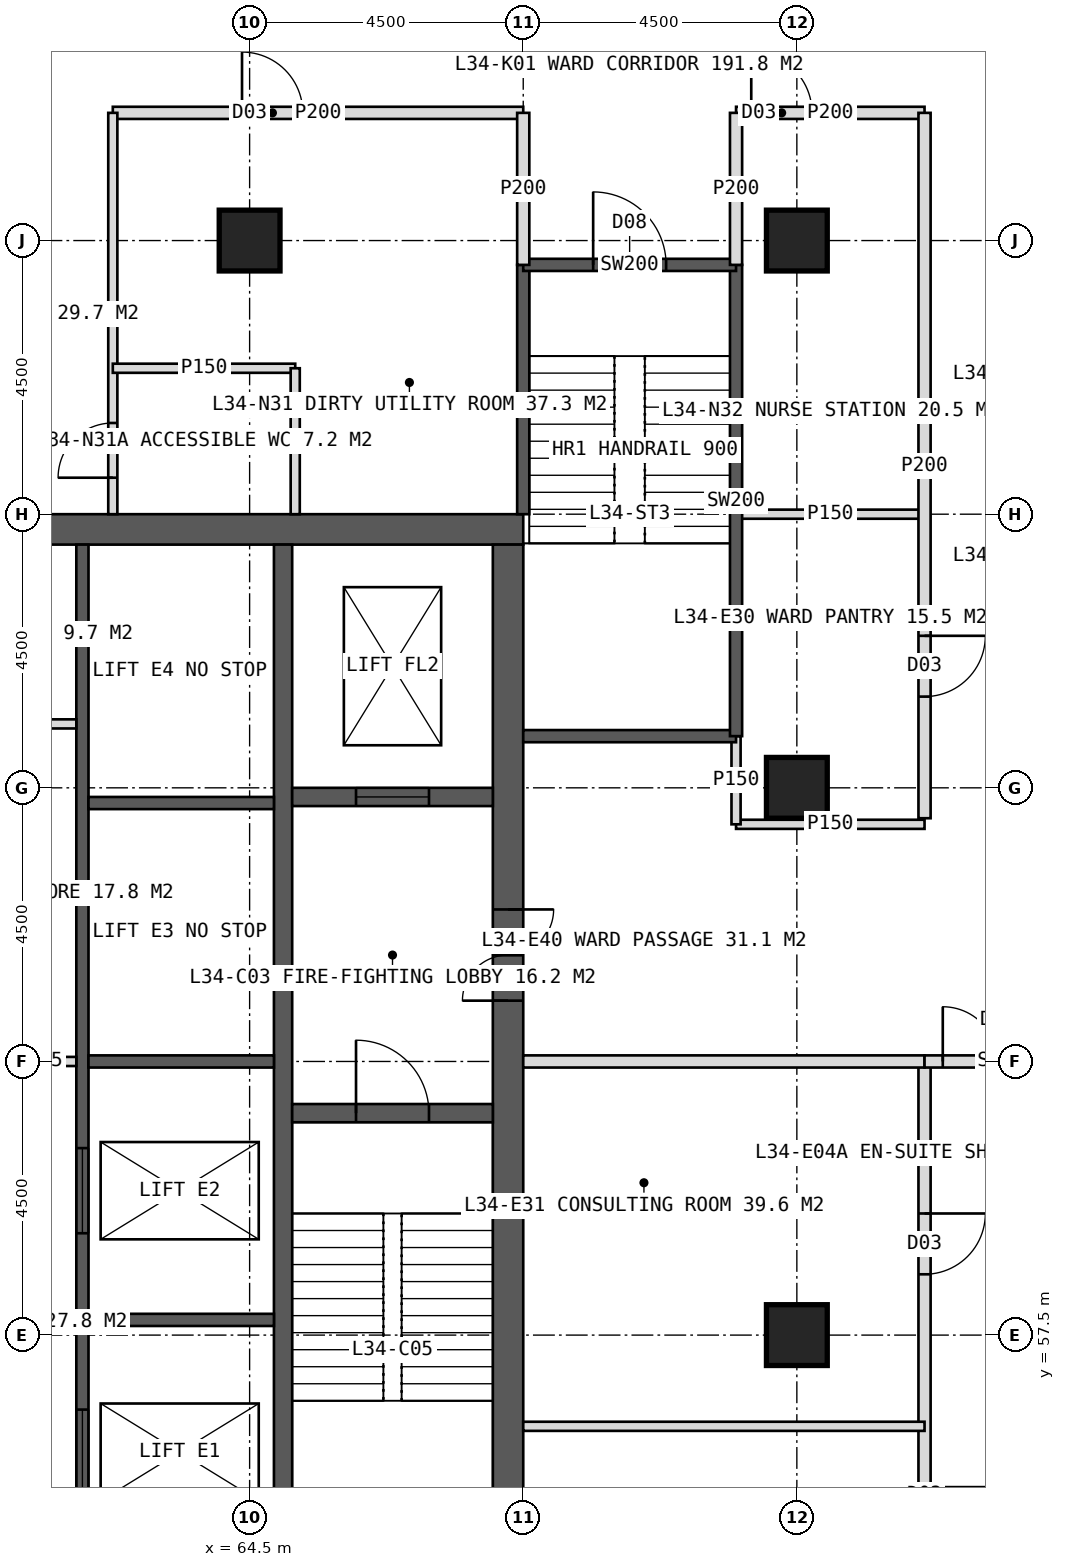
"""IFC4 building model, lengths in metres.
Left out: names, types, materials, properties, quantities, classifications, styles, units other than length and angle.
Written with IfcOpenShell. Run it as: python <this file> out.ifc"""

import sys

from ifc_helpers import new_model, si_unit, direction, frame, frame_2d, origin, origin_2d, place, context, subcontext, project, spatial, rectangle, hollow_rectangle, extrude, element, fill, save


model = new_model("IFC4")
c1 = context("Model", 3, precision=1e-05, world=origin(), true_north=direction((0.0, 1.0)))
c2 = subcontext(c1, "Body", "Model", "MODEL_VIEW")
j1 = project(units=[si_unit("LENGTHUNIT", "METRE"), si_unit("PLANEANGLEUNIT", "RADIAN")], contexts=[c1])
p1 = place(None, origin())
s1 = spatial("IfcSite", under=j1, at=p1, CompositionType="ELEMENT")
p2 = place(p1, origin())
s2 = spatial("IfcBuilding", under=s1, at=p2, CompositionType="ELEMENT")
p3 = place(p2, frame((0.0, 0.0, 144.0)))
s3 = spatial("IfcBuildingStorey", under=s2, at=p3, CompositionType="ELEMENT", Elevation=144.0)
p4 = place(p3, frame((51.0, 70.75, 0.0), z_axis=(0.0, 0.0, 1.0), x_axis=(1.0, 0.0, 0.0)))
e1 = element("IfcWall", 1, at=p4, inside=s3, PredefinedType="SHEAR", context=c2, shape_type="SweptSolid", body=[
    extrude(rectangle(XDim=18.0, YDim=0.5, at=frame_2d((9.0, 0.0))), origin(), (0.0, 0.0, 1.0), 4.0),
])
p5 = place(p4, frame((8.1, 0.0, 0.0)))
e2 = element("IfcOpeningElement", 2, at=p5, cuts=e1, PredefinedType="OPENING", context=c2, shape_type="SweptSolid", body=[
    extrude(rectangle(XDim=1.8, YDim=2.2, at=frame_2d((0.9, 1.1))), frame((0.0, 0.26, 0.0), z_axis=(0.0, -1.0, 0.0), x_axis=(1.0, 0.0, 0.0)), (0.0, 0.0, 1.0), 0.52),
])
p6 = place(p3, frame((68.75, 53.5, 0.0), z_axis=(0.0, 0.0, 1.0), x_axis=(0.0, 1.0, 0.0)))
e3 = element("IfcWall", 3, at=p6, inside=s3, PredefinedType="SHEAR", context=c2, shape_type="SweptSolid", body=[
    extrude(rectangle(XDim=17.0, YDim=0.5, at=frame_2d((8.5, 0.0))), origin(), (0.0, 0.0, 1.0), 4.0),
])
p7 = place(p6, frame((9.5, 0.0, 0.0)))
e4 = element("IfcOpeningElement", 4, at=p7, cuts=e3, PredefinedType="OPENING", context=c2, shape_type="SweptSolid", body=[
    extrude(rectangle(XDim=1.5, YDim=2.2, at=frame_2d((0.75, 1.1))), frame((0.0, 0.26, 0.0), z_axis=(0.0, -1.0, 0.0), x_axis=(1.0, 0.0, 0.0)), (0.0, 0.0, 1.0), 0.52),
])
p8 = place(p3, frame((65.05, 53.5, 0.0), z_axis=(0.0, 0.0, 1.0), x_axis=(0.0, 1.0, 0.0)))
e5 = element("IfcWall", 5, at=p8, inside=s3, PredefinedType="SHEAR", context=c2, shape_type="SweptSolid", body=[
    extrude(rectangle(XDim=17.0, YDim=0.3, at=frame_2d((8.5, 0.0))), origin(), (0.0, 0.0, 1.0), 4.0),
])
p9 = place(p3, frame((61.75, 53.5, 0.0), z_axis=(0.0, 0.0, 1.0), x_axis=(0.0, 1.0, 0.0)))
e6 = element("IfcWall", 6, at=p9, inside=s3, PredefinedType="SHEAR", context=c2, shape_type="SweptSolid", body=[
    extrude(rectangle(XDim=17.0, YDim=0.2, at=frame_2d((8.5, 0.0))), origin(), (0.0, 0.0, 1.0), 4.0),
])
p10 = place(p9, frame((1.375, 0.0, 0.0)))
e7 = element("IfcOpeningElement", 7, at=p10, cuts=e6, PredefinedType="OPENING", context=c2, shape_type="SweptSolid", body=[
    extrude(rectangle(XDim=1.4, YDim=2.2, at=frame_2d((0.7, 1.1))), frame((0.0, 0.11, 0.0), z_axis=(0.0, -1.0, 0.0), x_axis=(1.0, 0.0, 0.0)), (0.0, 0.0, 1.0), 0.22),
])
p11 = place(p9, frame((5.675, 0.0, 0.0)))
e8 = element("IfcOpeningElement", 8, at=p11, cuts=e6, PredefinedType="OPENING", context=c2, shape_type="SweptSolid", body=[
    extrude(rectangle(XDim=1.4, YDim=2.2, at=frame_2d((0.7, 1.1))), frame((0.0, 0.11, 0.0), z_axis=(0.0, -1.0, 0.0), x_axis=(1.0, 0.0, 0.0)), (0.0, 0.0, 1.0), 0.22),
])
for number, where, z_axis, x_axis in (
    (9, (61.85, 57.75, 0.0), (0.0, 0.0, 1.0), (1.0, 0.0, 0.0)),
    (10, (61.85, 62.0, 0.0), (0.0, 0.0, 1.0), (1.0, 0.0, 0.0)),
    (11, (61.85, 66.25, 0.0), (0.0, 0.0, 1.0), (1.0, 0.0, 0.0)),
):
    element("IfcWall", number, at=place(p3, frame(where, z_axis=z_axis, x_axis=x_axis)), inside=s3, PredefinedType="SHEAR", context=c2, shape_type="SweptSolid", body=[
        extrude(rectangle(XDim=3.05, YDim=0.2, at=frame_2d((1.525, 0.0))), origin(), (0.0, 0.0, 1.0), 4.0),
    ])
p12 = place(p3, frame((65.2, 61.15, 0.0), z_axis=(0.0, 0.0, 1.0), x_axis=(1.0, 0.0, 0.0)))
e12 = element("IfcWall", 12, at=p12, inside=s3, PredefinedType="SHEAR", context=c2, shape_type="SweptSolid", body=[
    extrude(rectangle(XDim=3.3, YDim=0.3, at=frame_2d((1.65, 0.0))), origin(), (0.0, 0.0, 1.0), 4.0),
])
p13 = place(p12, frame((1.05, 0.0, 0.0)))
e13 = element("IfcOpeningElement", 13, at=p13, cuts=e12, PredefinedType="OPENING", context=c2, shape_type="SweptSolid", body=[
    extrude(rectangle(XDim=1.2, YDim=2.1, at=frame_2d((0.6, 1.05))), frame((0.0, 0.16, 0.0), z_axis=(0.0, -1.0, 0.0), x_axis=(1.0, 0.0, 0.0)), (0.0, 0.0, 1.0), 0.32),
])
p14 = place(p3, frame((65.2, 66.35, 0.0), z_axis=(0.0, 0.0, 1.0), x_axis=(1.0, 0.0, 0.0)))
e14 = element("IfcWall", 14, at=p14, inside=s3, PredefinedType="SHEAR", context=c2, shape_type="SweptSolid", body=[
    extrude(rectangle(XDim=3.3, YDim=0.3, at=frame_2d((1.65, 0.0))), origin(), (0.0, 0.0, 1.0), 4.0),
])
p15 = place(p14, frame((1.05, 0.0, 0.0)))
e15 = element("IfcOpeningElement", 15, at=p15, cuts=e14, PredefinedType="OPENING", context=c2, shape_type="SweptSolid", body=[
    extrude(rectangle(XDim=1.2, YDim=2.2, at=frame_2d((0.6, 1.1))), frame((0.0, 0.16, 0.0), z_axis=(0.0, -1.0, 0.0), x_axis=(1.0, 0.0, 0.0)), (0.0, 0.0, 1.0), 0.32),
])
for number, where, z_axis, x_axis in (
    (16, (73.5, 75.5, 0.0), (0.0, 0.0, 1.0), (1.0, 0.0, 0.0)),
    (17, (64.5, 75.5, 0.0), (0.0, 0.0, 1.0), (1.0, 0.0, 0.0)),
    (18, (73.5, 57.5, 0.0), (0.0, 0.0, 1.0), (1.0, 0.0, 0.0)),
    (19, (73.5, 66.5, 0.0), (0.0, 0.0, 1.0), (1.0, 0.0, 0.0)),
):
    element("IfcColumn", number, at=place(p3, frame(where, z_axis=z_axis, x_axis=x_axis)), inside=s3, PredefinedType="COLUMN", context=c2, shape_type="SweptSolid", body=[
        extrude(hollow_rectangle(XDim=1.0, YDim=1.0, WallThickness=0.1, at=origin_2d()), origin(), (0.0, 0.0, 1.0), 4.0),
    ])
p16 = place(p3, frame((62.25, 77.6, 0.0), z_axis=(0.0, 0.0, 1.0), x_axis=(1.0, 0.0, 0.0)))
e20 = element("IfcWall", 20, at=p16, inside=s3, PredefinedType="PARTITIONING", context=c2, shape_type="SweptSolid", body=[
    extrude(rectangle(XDim=6.75, YDim=0.2, at=frame_2d((3.375, 0.0))), origin(), (0.0, 0.0, 1.0), 3.75),
])
p17 = place(p16, frame((2.125, 0.0, 0.0)))
e21 = element("IfcOpeningElement", 21, at=p17, cuts=e20, PredefinedType="OPENING", context=c2, shape_type="SweptSolid", body=[
    extrude(rectangle(XDim=1.0, YDim=2.1, at=frame_2d((0.5, 1.05))), frame((0.0, 0.11, 0.0), z_axis=(0.0, -1.0, 0.0), x_axis=(1.0, 0.0, 0.0)), (0.0, 0.0, 1.0), 0.22),
])
p18 = place(p3, frame((72.5, 77.6, 0.0), z_axis=(0.0, 0.0, 1.0), x_axis=(1.0, 0.0, 0.0)))
e22 = element("IfcWall", 22, at=p18, inside=s3, PredefinedType="PARTITIONING", context=c2, shape_type="SweptSolid", body=[
    extrude(rectangle(XDim=3.1, YDim=0.2, at=frame_2d((1.55, 0.0))), origin(), (0.0, 0.0, 1.0), 3.75),
])
p19 = place(p18, frame((0.25, 0.0, 0.0)))
e23 = element("IfcOpeningElement", 23, at=p19, cuts=e22, PredefinedType="OPENING", context=c2, shape_type="SweptSolid", body=[
    extrude(rectangle(XDim=1.0, YDim=2.1, at=frame_2d((0.5, 1.05))), frame((0.0, 0.11, 0.0), z_axis=(0.0, -1.0, 0.0), x_axis=(1.0, 0.0, 0.0)), (0.0, 0.0, 1.0), 0.22),
])
p20 = place(p3, frame((62.25, 71.0, 0.0), z_axis=(0.0, 0.0, 1.0), x_axis=(0.0, 1.0, 0.0)))
e24 = element("IfcWall", 24, at=p20, inside=s3, PredefinedType="PARTITIONING", context=c2, shape_type="SweptSolid", body=[
    extrude(rectangle(XDim=6.6, YDim=0.15, at=frame_2d((3.3, 0.0))), origin(), (0.0, 0.0, 1.0), 3.75),
])
p21 = place(p20, frame((0.6, 0.0, 0.0)))
e25 = element("IfcOpeningElement", 25, at=p21, cuts=e24, PredefinedType="OPENING", context=c2, shape_type="SweptSolid", body=[
    extrude(rectangle(XDim=0.9, YDim=2.1, at=frame_2d((0.45, 1.05))), frame((0.0, 0.085, 0.0), z_axis=(0.0, -1.0, 0.0), x_axis=(1.0, 0.0, 0.0)), (0.0, 0.0, 1.0), 0.17),
])
p22 = place(p3, frame((62.25, 73.4, 0.0), z_axis=(0.0, 0.0, 1.0), x_axis=(1.0, 0.0, 0.0)))
e26 = element("IfcWall", 26, at=p22, inside=s3, PredefinedType="PARTITIONING", context=c2, shape_type="SweptSolid", body=[
    extrude(rectangle(XDim=3.0, YDim=0.15, at=frame_2d((1.5, 0.0))), origin(), (0.0, 0.0, 1.0), 3.75),
])
p23 = place(p3, frame((65.25, 71.0, 0.0), z_axis=(0.0, 0.0, 1.0), x_axis=(0.0, 1.0, 0.0)))
e27 = element("IfcWall", 27, at=p23, inside=s3, PredefinedType="PARTITIONING", context=c2, shape_type="SweptSolid", body=[
    extrude(rectangle(XDim=2.4, YDim=0.15, at=frame_2d((1.2, 0.0))), origin(), (0.0, 0.0, 1.0), 3.75),
])
p24 = place(p3, frame((72.5, 71.0, 0.0), z_axis=(0.0, 0.0, 1.0), x_axis=(1.0, 0.0, 0.0)))
e28 = element("IfcWall", 28, at=p24, inside=s3, PredefinedType="PARTITIONING", context=c2, shape_type="SweptSolid", body=[
    extrude(rectangle(XDim=3.1, YDim=0.15, at=frame_2d((1.55, 0.0))), origin(), (0.0, 0.0, 1.0), 3.75),
])
p25 = place(p3, frame((75.6, 77.6, 0.0), z_axis=(0.0, 0.0, 1.0), x_axis=(0.0, -1.0, 0.0)))
e29 = element("IfcWall", 29, at=p25, inside=s3, PredefinedType="PARTITIONING", context=c2, shape_type="SweptSolid", body=[
    extrude(rectangle(XDim=11.6, YDim=0.2, at=frame_2d((5.8, 0.0))), origin(), (0.0, 0.0, 1.0), 3.75),
])
p26 = place(p25, frame((8.6, 0.0, 0.0)))
e30 = element("IfcOpeningElement", 30, at=p26, cuts=e29, PredefinedType="OPENING", context=c2, shape_type="SweptSolid", body=[
    extrude(rectangle(XDim=1.0, YDim=2.1, at=frame_2d((0.5, 1.05))), frame((0.0, 0.11, 0.0), z_axis=(0.0, -1.0, 0.0), x_axis=(1.0, 0.0, 0.0)), (0.0, 0.0, 1.0), 0.22),
])
p27 = place(p3, frame((75.6, 62.0, 0.0), z_axis=(0.0, 0.0, 1.0), x_axis=(0.0, -1.0, 0.0)))
e31 = element("IfcWall", 31, at=p27, inside=s3, PredefinedType="PARTITIONING", context=c2, shape_type="SweptSolid", body=[
    extrude(rectangle(XDim=15.6, YDim=0.2, at=frame_2d((7.8, 0.0))), origin(), (0.0, 0.0, 1.0), 3.75),
])
p28 = place(p27, frame((2.5, 0.0, 0.0)))
e32 = element("IfcOpeningElement", 32, at=p28, cuts=e31, PredefinedType="OPENING", context=c2, shape_type="SweptSolid", body=[
    extrude(rectangle(XDim=1.0, YDim=2.1, at=frame_2d((0.5, 1.05))), frame((0.0, 0.11, 0.0), z_axis=(0.0, -1.0, 0.0), x_axis=(1.0, 0.0, 0.0)), (0.0, 0.0, 1.0), 0.22),
])
p29 = place(p27, frame((7.0, 0.0, 0.0)))
e33 = element("IfcOpeningElement", 33, at=p29, cuts=e31, PredefinedType="OPENING", context=c2, shape_type="SweptSolid", body=[
    extrude(rectangle(XDim=1.0, YDim=2.1, at=frame_2d((0.5, 1.05))), frame((0.0, 0.11, 0.0), z_axis=(0.0, -1.0, 0.0), x_axis=(1.0, 0.0, 0.0)), (0.0, 0.0, 1.0), 0.22),
])
p30 = place(p27, frame((11.8, 0.0, 0.0)))
e34 = element("IfcOpeningElement", 34, at=p30, cuts=e31, PredefinedType="OPENING", context=c2, shape_type="SweptSolid", body=[
    extrude(rectangle(XDim=1.0, YDim=2.1, at=frame_2d((0.5, 1.05))), frame((0.0, 0.11, 0.0), z_axis=(0.0, -1.0, 0.0), x_axis=(1.0, 0.0, 0.0)), (0.0, 0.0, 1.0), 0.22),
])
p31 = place(p3, frame((72.5, 65.9, 0.0), z_axis=(0.0, 0.0, 1.0), x_axis=(1.0, 0.0, 0.0)))
e35 = element("IfcWall", 35, at=p31, inside=s3, PredefinedType="PARTITIONING", context=c2, shape_type="SweptSolid", body=[
    extrude(rectangle(XDim=3.1, YDim=0.15, at=frame_2d((1.55, 0.0))), origin(), (0.0, 0.0, 1.0), 3.75),
])
p32 = place(p3, frame((69.0, 62.0, 0.0), z_axis=(0.0, 0.0, 1.0), x_axis=(1.0, 0.0, 0.0)))
e36 = element("IfcWall", 36, at=p32, inside=s3, PredefinedType="SOLIDWALL", context=c2, shape_type="SweptSolid", body=[
    extrude(rectangle(XDim=6.6, YDim=0.2, at=frame_2d((3.3, 0.0))), origin(), (0.0, 0.0, 1.0), 2.95),
])
p33 = place(p3, frame((69.0, 56.0, 0.0), z_axis=(0.0, 0.0, 1.0), x_axis=(1.0, 0.0, 0.0)))
e37 = element("IfcWall", 37, at=p33, inside=s3, PredefinedType="PARTITIONING", context=c2, shape_type="SweptSolid", body=[
    extrude(rectangle(XDim=6.6, YDim=0.15, at=frame_2d((3.3, 0.0))), origin(), (0.0, 0.0, 1.0), 3.75),
])
p34 = place(p3, frame((75.6, 62.0, 0.0), z_axis=(0.0, 0.0, 1.0), x_axis=(1.0, 0.0, 0.0)))
e38 = element("IfcWall", 38, at=p34, inside=s3, PredefinedType="SOLIDWALL", context=c2, shape_type="SweptSolid", body=[
    extrude(rectangle(XDim=2.7, YDim=0.2, at=frame_2d((1.35, 0.0))), origin(), (0.0, 0.0, 1.0), 2.95),
])
p35 = place(p34, frame((0.3, 0.0, 0.0)))
e39 = element("IfcOpeningElement", 39, at=p35, cuts=e38, PredefinedType="OPENING", context=c2, shape_type="SweptSolid", body=[
    extrude(rectangle(XDim=1.8, YDim=2.2, at=frame_2d((0.9, 1.1))), frame((0.0, 0.11, 0.0), z_axis=(0.0, -1.0, 0.0), x_axis=(1.0, 0.0, 0.0)), (0.0, 0.0, 1.0), 0.22),
])
p36 = place(p3, frame((58.35, 62.0, 0.0), z_axis=(0.0, 0.0, 1.0), x_axis=(1.0, 0.0, 0.0)))
e40 = element("IfcWall", 40, at=p36, inside=s3, PredefinedType="PARTITIONING", context=c2, shape_type="SweptSolid", body=[
    extrude(rectangle(XDim=3.3, YDim=0.15, at=frame_2d((1.65, 0.0))), origin(), (0.0, 0.0, 1.0), 3.75),
])
p37 = place(p36, frame((1.15, 0.0, 0.0)))
e41 = element("IfcOpeningElement", 41, at=p37, cuts=e40, PredefinedType="OPENING", context=c2, shape_type="SweptSolid", body=[
    extrude(rectangle(XDim=1.0, YDim=2.1, at=frame_2d((0.5, 1.05))), frame((0.0, 0.085, 0.0), z_axis=(0.0, -1.0, 0.0), x_axis=(1.0, 0.0, 0.0)), (0.0, 0.0, 1.0), 0.17),
])
p38 = place(p3, frame((58.35, 67.551, 0.0), z_axis=(0.0, 0.0, 1.0), x_axis=(1.0, 0.0, 0.0)))
e42 = element("IfcWall", 42, at=p38, inside=s3, PredefinedType="PARTITIONING", context=c2, shape_type="SweptSolid", body=[
    extrude(rectangle(XDim=3.3, YDim=0.15, at=frame_2d((1.65, 0.0))), origin(), (0.0, 0.0, 1.0), 3.75),
])
p39 = place(p3, frame((72.5, 65.9, 0.0), z_axis=(0.0, 0.0, 1.0), x_axis=(0.0, 1.0, 0.0)))
e43 = element("IfcWall", 43, at=p39, inside=s3, PredefinedType="PARTITIONING", context=c2, shape_type="SweptSolid", body=[
    extrude(rectangle(XDim=1.45, YDim=0.15, at=frame_2d((0.725, 0.0))), origin(), (0.0, 0.0, 1.0), 3.75),
])
p40 = place(p3, frame((69.0, 71.0, 0.0), z_axis=(0.0, 0.0, 1.0), x_axis=(0.0, 1.0, 0.0)))
e44 = element("IfcWall", 44, at=p40, inside=s3, PredefinedType="SOLIDWALL", context=c2, shape_type="SweptSolid", body=[
    extrude(rectangle(XDim=4.1, YDim=0.2, at=frame_2d((2.05, 0.0))), origin(), (0.0, 0.0, 1.0), 3.75),
])
p41 = place(p3, frame((69.0, 67.35, 0.0), z_axis=(0.0, 0.0, 1.0), x_axis=(1.0, 0.0, 0.0)))
e45 = element("IfcWall", 45, at=p41, inside=s3, PredefinedType="SOLIDWALL", context=c2, shape_type="SweptSolid", body=[
    extrude(rectangle(XDim=3.5, YDim=0.2, at=frame_2d((1.75, 0.0))), origin(), (0.0, 0.0, 1.0), 3.75),
])
p42 = place(p3, frame((72.5, 67.35, 0.0), z_axis=(0.0, 0.0, 1.0), x_axis=(0.0, 1.0, 0.0)))
e46 = element("IfcWall", 46, at=p42, inside=s3, PredefinedType="SOLIDWALL", context=c2, shape_type="SweptSolid", body=[
    extrude(rectangle(XDim=7.75, YDim=0.2, at=frame_2d((3.875, 0.0))), origin(), (0.0, 0.0, 1.0), 3.75),
])
p43 = place(p3, frame((69.0, 75.1, 0.0), z_axis=(0.0, 0.0, 1.0), x_axis=(1.0, 0.0, 0.0)))
e47 = element("IfcWall", 47, at=p43, inside=s3, PredefinedType="SOLIDWALL", context=c2, shape_type="SweptSolid", body=[
    extrude(rectangle(XDim=3.5, YDim=0.2, at=frame_2d((1.75, 0.0))), origin(), (0.0, 0.0, 1.0), 3.75),
])
p44 = place(p43, frame((1.15, 0.0, 0.0)))
e48 = element("IfcOpeningElement", 48, at=p44, cuts=e47, PredefinedType="OPENING", context=c2, shape_type="SweptSolid", body=[
    extrude(rectangle(XDim=1.2, YDim=2.1, at=frame_2d((0.6, 1.05))), frame((0.0, 0.11, 0.0), z_axis=(0.0, -1.0, 0.0), x_axis=(1.0, 0.0, 0.0)), (0.0, 0.0, 1.0), 0.22),
])
for number, where, z_axis, x_axis in (
    (49, (69.0, 75.1, 0.0), (0.0, 0.0, 1.0), (0.0, 1.0, 0.0)),
    (50, (72.5, 75.1, 0.0), (0.0, 0.0, 1.0), (0.0, 1.0, 0.0)),
):
    element("IfcWall", number, at=place(p3, frame(where, z_axis=z_axis, x_axis=x_axis)), inside=s3, PredefinedType="PARTITIONING", context=c2, shape_type="SweptSolid", body=[
        extrude(rectangle(XDim=2.5, YDim=0.2, at=frame_2d((1.25, 0.0))), origin(), (0.0, 0.0, 1.0), 3.75),
    ])
p45 = place(p21, origin())
e51 = element("IfcDoor", 51, at=p45, inside=s3, OperationType="SINGLE_SWING_LEFT", PredefinedType="DOOR", context=c2, shape_type="SweptSolid", body=[
    extrude(rectangle(XDim=0.9, YDim=2.1, at=frame_2d((0.45, 1.05))), frame((0.0, 0.025, 0.0), z_axis=(0.0, -1.0, 0.0), x_axis=(1.0, 0.0, 0.0)), (0.0, 0.0, 1.0), 0.05),
])
fill(e25, e51)
p46 = place(p17, origin())
e52 = element("IfcDoor", 52, at=p46, inside=s3, OperationType="SINGLE_SWING_LEFT", PredefinedType="DOOR", context=c2, shape_type="SweptSolid", body=[
    extrude(rectangle(XDim=1.0, YDim=2.1, at=frame_2d((0.5, 1.05))), frame((0.0, 0.025, 0.0), z_axis=(0.0, -1.0, 0.0), x_axis=(1.0, 0.0, 0.0)), (0.0, 0.0, 1.0), 0.05),
])
fill(e21, e52)
p47 = place(p19, origin())
e53 = element("IfcDoor", 53, at=p47, inside=s3, OperationType="SINGLE_SWING_LEFT", PredefinedType="DOOR", context=c2, shape_type="SweptSolid", body=[
    extrude(rectangle(XDim=1.0, YDim=2.1, at=frame_2d((0.5, 1.05))), frame((0.0, 0.025, 0.0), z_axis=(0.0, -1.0, 0.0), x_axis=(1.0, 0.0, 0.0)), (0.0, 0.0, 1.0), 0.05),
])
fill(e23, e53)
p48 = place(p26, origin())
e54 = element("IfcDoor", 54, at=p48, inside=s3, OperationType="SINGLE_SWING_LEFT", PredefinedType="DOOR", context=c2, shape_type="SweptSolid", body=[
    extrude(rectangle(XDim=1.0, YDim=2.1, at=frame_2d((0.5, 1.05))), frame((0.0, 0.025, 0.0), z_axis=(0.0, -1.0, 0.0), x_axis=(1.0, 0.0, 0.0)), (0.0, 0.0, 1.0), 0.05),
])
fill(e30, e54)
p49 = place(p28, origin())
e55 = element("IfcDoor", 55, at=p49, inside=s3, OperationType="SINGLE_SWING_LEFT", PredefinedType="DOOR", context=c2, shape_type="SweptSolid", body=[
    extrude(rectangle(XDim=1.0, YDim=2.1, at=frame_2d((0.5, 1.05))), frame((0.0, 0.025, 0.0), z_axis=(0.0, -1.0, 0.0), x_axis=(1.0, 0.0, 0.0)), (0.0, 0.0, 1.0), 0.05),
])
fill(e32, e55)
p50 = place(p35, origin())
e56 = element("IfcDoor", 56, at=p50, inside=s3, OperationType="DOUBLE_DOOR_DOUBLE_SWING", PredefinedType="DOOR", context=c2, shape_type="SweptSolid", body=[
    extrude(rectangle(XDim=1.8, YDim=2.2, at=frame_2d((0.9, 1.1))), frame((0.0, 0.025, 0.0), z_axis=(0.0, -1.0, 0.0), x_axis=(1.0, 0.0, 0.0)), (0.0, 0.0, 1.0), 0.05),
])
fill(e39, e56)
p51 = place(p7, origin())
e57 = element("IfcDoor", 57, at=p51, inside=s3, OperationType="DOUBLE_DOOR_SINGLE_SWING", PredefinedType="DOOR", context=c2, shape_type="SweptSolid", body=[
    extrude(rectangle(XDim=1.5, YDim=2.2, at=frame_2d((0.75, 1.1))), frame((0.0, 0.025, 0.0), z_axis=(0.0, -1.0, 0.0), x_axis=(1.0, 0.0, 0.0)), (0.0, 0.0, 1.0), 0.05),
])
fill(e4, e57)
p52 = place(p13, origin())
e58 = element("IfcDoor", 58, at=p52, inside=s3, OperationType="SINGLE_SWING_LEFT", PredefinedType="DOOR", context=c2, shape_type="SweptSolid", body=[
    extrude(rectangle(XDim=1.2, YDim=2.1, at=frame_2d((0.6, 1.05))), frame((0.0, 0.025, 0.0), z_axis=(0.0, -1.0, 0.0), x_axis=(1.0, 0.0, 0.0)), (0.0, 0.0, 1.0), 0.05),
])
fill(e13, e58)
p53 = place(p15, origin())
e59 = element("IfcDoor", 59, at=p53, inside=s3, OperationType="SLIDING_TO_LEFT", PredefinedType="DOOR", context=c2, shape_type="SweptSolid", body=[
    extrude(rectangle(XDim=1.2, YDim=2.2, at=frame_2d((0.6, 1.1))), frame((0.0, 0.025, 0.0), z_axis=(0.0, -1.0, 0.0), x_axis=(1.0, 0.0, 0.0)), (0.0, 0.0, 1.0), 0.05),
])
fill(e15, e59)
p54 = place(p10, origin())
e60 = element("IfcDoor", 60, at=p54, inside=s3, OperationType="SLIDING_TO_LEFT", PredefinedType="DOOR", context=c2, shape_type="SweptSolid", body=[
    extrude(rectangle(XDim=1.4, YDim=2.2, at=frame_2d((0.7, 1.1))), frame((0.0, 0.025, 0.0), z_axis=(0.0, -1.0, 0.0), x_axis=(1.0, 0.0, 0.0)), (0.0, 0.0, 1.0), 0.05),
])
fill(e7, e60)
p55 = place(p11, origin())
e61 = element("IfcDoor", 61, at=p55, inside=s3, OperationType="SLIDING_TO_LEFT", PredefinedType="DOOR", context=c2, shape_type="SweptSolid", body=[
    extrude(rectangle(XDim=1.4, YDim=2.2, at=frame_2d((0.7, 1.1))), frame((0.0, 0.025, 0.0), z_axis=(0.0, -1.0, 0.0), x_axis=(1.0, 0.0, 0.0)), (0.0, 0.0, 1.0), 0.05),
])
fill(e8, e61)
p56 = place(p44, origin())
e62 = element("IfcDoor", 62, at=p56, inside=s3, OperationType="SINGLE_SWING_LEFT", PredefinedType="DOOR", context=c2, shape_type="SweptSolid", body=[
    extrude(rectangle(XDim=1.2, YDim=2.1, at=frame_2d((0.6, 1.05))), frame((0.0, 0.025, 0.0), z_axis=(0.0, -1.0, 0.0), x_axis=(1.0, 0.0, 0.0)), (0.0, 0.0, 1.0), 0.05),
])
fill(e48, e62)
save(model, sys.argv[1])
